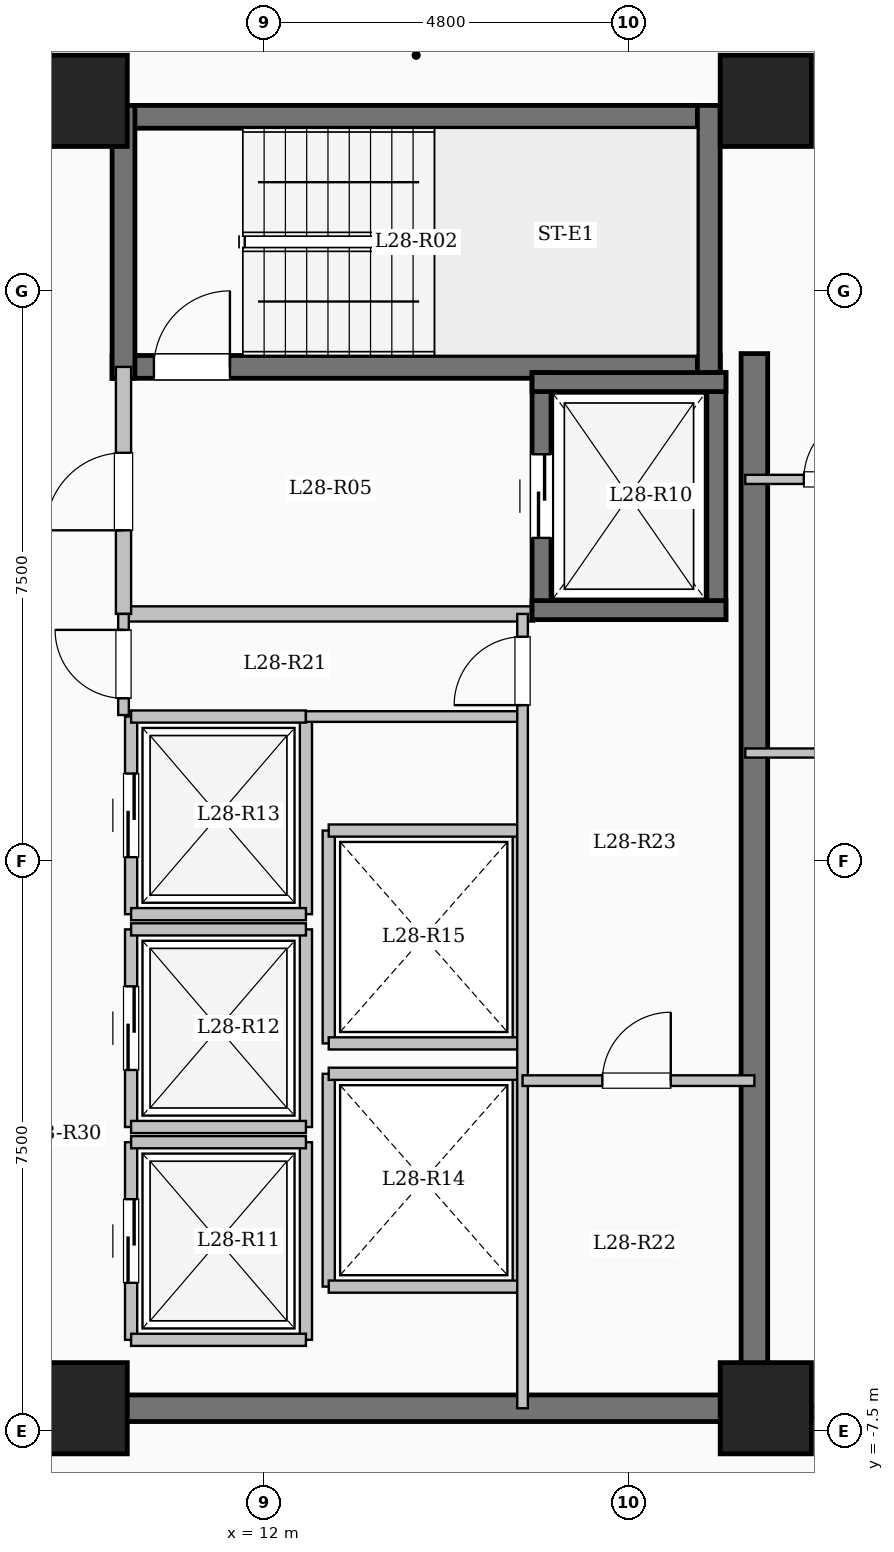
"""IFC4 building model, lengths in metres.
Left out: names, types, materials, properties, quantities, classifications, styles, units other than length and angle.
Written with IfcOpenShell. Run it as: python <this file> out.ifc"""

import sys

from ifc_helpers import new_model, si_unit, direction, frame, frame_2d, origin, origin_2d, place, context, subcontext, project, spatial, rectangle, extrude, element, fill, save


model = new_model("IFC4")
c1 = context("Model", 3, precision=1e-05, world=origin(), true_north=direction((0.0, 1.0)))
c2 = subcontext(c1, "Body", "Model", "MODEL_VIEW")
j1 = project(units=[si_unit("LENGTHUNIT", "METRE"), si_unit("PLANEANGLEUNIT", "RADIAN")], contexts=[c1])
p1 = place(None, origin())
s1 = spatial("IfcSite", under=j1, at=p1, CompositionType="ELEMENT")
p2 = place(p1, origin())
s2 = spatial("IfcBuilding", under=s1, at=p2, CompositionType="ELEMENT")
p3 = place(p2, frame((0.0, 0.0, 105.1)))
s3 = spatial("IfcBuildingStorey", under=s2, at=p3, CompositionType="ELEMENT", Elevation=105.1)
for number, where, z_axis, x_axis in (
    (1, (9.6, -7.2, 0.0), (0.0, 0.0, 1.0), (1.0, 0.0, 0.0)),
    (2, (9.6, 10.0, 0.0), (0.0, 0.0, 1.0), (1.0, 0.0, 0.0)),
    (3, (18.6, -7.2, 0.0), (0.0, 0.0, 1.0), (1.0, 0.0, 0.0)),
    (4, (18.6, 10.0, 0.0), (0.0, 0.0, 1.0), (1.0, 0.0, 0.0)),
):
    element("IfcColumn", number, at=place(p3, frame(where, z_axis=z_axis, x_axis=x_axis)), inside=s3, PredefinedType="COLUMN", context=c2, shape_type="SweptSolid", body=[
        extrude(rectangle(XDim=1.2, YDim=1.2, at=origin_2d()), origin(), (0.0, 0.0, 1.0), 3.35),
    ])
p4 = place(p3, frame((10.0, 9.79, 0.0), z_axis=(0.0, 0.0, 1.0), x_axis=(1.0, 0.0, 0.0)))
e5 = element("IfcWall", 5, at=p4, inside=s3, PredefinedType="SHEAR", context=c2, shape_type="SweptSolid", body=[
    extrude(rectangle(XDim=8.0, YDim=0.3, at=frame_2d((4.0, 0.0))), origin(), (0.0, 0.0, 1.0), 3.35),
])
p5 = place(p3, frame((10.0, 6.5, 0.0), z_axis=(0.0, 0.0, 1.0), x_axis=(1.0, 0.0, 0.0)))
e6 = element("IfcWall", 6, at=p5, inside=s3, PredefinedType="SHEAR", context=c2, shape_type="SweptSolid", body=[
    extrude(rectangle(XDim=8.0, YDim=0.3, at=frame_2d((4.0, 0.0))), origin(), (0.0, 0.0, 1.0), 3.35),
])
p6 = place(p5, frame((0.55, 0.0, 0.0)))
e7 = element("IfcOpeningElement", 7, at=p6, cuts=e6, PredefinedType="OPENING", context=c2, shape_type="SweptSolid", body=[
    extrude(rectangle(XDim=1.0, YDim=2.15, at=frame_2d((0.5, 1.075))), frame((0.0, 0.16, 0.0), z_axis=(0.0, -1.0, 0.0), x_axis=(1.0, 0.0, 0.0)), (0.0, 0.0, 1.0), 0.32),
])
for number, where, z_axis, x_axis in (
    (8, (10.15, 6.35, 0.0), (0.0, 0.0, 1.0), (0.0, 1.0, 0.0)),
    (9, (17.85, 6.35, 0.0), (0.0, 0.0, 1.0), (0.0, 1.0, 0.0)),
):
    element("IfcWall", number, at=place(p3, frame(where, z_axis=z_axis, x_axis=x_axis)), inside=s3, PredefinedType="SHEAR", context=c2, shape_type="SweptSolid", body=[
        extrude(rectangle(XDim=3.59, YDim=0.3, at=frame_2d((1.795, 0.0))), origin(), (0.0, 0.0, 1.0), 3.35),
    ])
p7 = place(p3, frame((10.15, 3.25, 0.0), z_axis=(0.0, 0.0, 1.0), x_axis=(1.0, 0.0, 0.0)))
e10 = element("IfcWall", 10, at=p7, inside=s3, PredefinedType="SOLIDWALL", context=c2, shape_type="SweptSolid", body=[
    extrude(rectangle(XDim=5.4, YDim=0.2, at=frame_2d((2.7, 0.0))), origin(), (0.0, 0.0, 1.0), 3.1),
])
p8 = place(p3, frame((10.15, 3.25, 0.0), z_axis=(0.0, 0.0, 1.0), x_axis=(0.0, 1.0, 0.0)))
e11 = element("IfcWall", 11, at=p8, inside=s3, PredefinedType="SOLIDWALL", context=c2, shape_type="SweptSolid", body=[
    extrude(rectangle(XDim=3.25, YDim=0.2, at=frame_2d((1.625, 0.0))), origin(), (0.0, 0.0, 1.0), 3.1),
])
p9 = place(p8, frame((1.1, 0.0, 0.0)))
e12 = element("IfcOpeningElement", 12, at=p9, cuts=e11, PredefinedType="OPENING", context=c2, shape_type="SweptSolid", body=[
    extrude(rectangle(XDim=1.02, YDim=2.15, at=frame_2d((0.51, 1.075))), frame((0.0, 0.11, 0.0), z_axis=(0.0, -1.0, 0.0), x_axis=(1.0, 0.0, 0.0)), (0.0, 0.0, 1.0), 0.22),
])
p10 = place(p3, frame((15.65, 3.175, 0.0), z_axis=(0.0, 0.0, 1.0), x_axis=(0.0, 1.0, 0.0)))
e13 = element("IfcWall", 13, at=p10, inside=s3, PredefinedType="SHEAR", context=c2, shape_type="SweptSolid", body=[
    extrude(rectangle(XDim=3.25, YDim=0.25, at=frame_2d((1.625, 0.0))), origin(), (0.0, 0.0, 1.0), 3.35),
])
p11 = place(p10, frame((1.075, 0.0, 0.0)))
e14 = element("IfcOpeningElement", 14, at=p11, cuts=e13, PredefinedType="OPENING", context=c2, shape_type="SweptSolid", body=[
    extrude(rectangle(XDim=1.1, YDim=2.15, at=frame_2d((0.55, 1.075))), frame((0.0, 0.135, 0.0), z_axis=(0.0, -1.0, 0.0), x_axis=(1.0, 0.0, 0.0)), (0.0, 0.0, 1.0), 0.27),
])
p12 = place(p3, frame((17.95, 3.175, 0.0), z_axis=(0.0, 0.0, 1.0), x_axis=(0.0, 1.0, 0.0)))
e15 = element("IfcWall", 15, at=p12, inside=s3, PredefinedType="SHEAR", context=c2, shape_type="SweptSolid", body=[
    extrude(rectangle(XDim=3.25, YDim=0.25, at=frame_2d((1.625, 0.0))), origin(), (0.0, 0.0, 1.0), 3.35),
])
for number, where, z_axis, x_axis in (
    (16, (15.525, 3.3, 0.0), (0.0, 0.0, 1.0), (1.0, 0.0, 0.0)),
    (17, (15.525, 6.3, 0.0), (0.0, 0.0, 1.0), (1.0, 0.0, 0.0)),
):
    element("IfcWall", number, at=place(p3, frame(where, z_axis=z_axis, x_axis=x_axis)), inside=s3, PredefinedType="SHEAR", context=c2, shape_type="SweptSolid", body=[
        extrude(rectangle(XDim=2.55, YDim=0.25, at=frame_2d((1.275, 0.0))), origin(), (0.0, 0.0, 1.0), 3.35),
    ])
p13 = place(p3, frame((10.25, -6.3, 0.0), z_axis=(0.0, 0.0, 1.0), x_axis=(0.0, 1.0, 0.0)))
e18 = element("IfcWall", 18, at=p13, inside=s3, PredefinedType="SOLIDWALL", context=c2, shape_type="SweptSolid", body=[
    extrude(rectangle(XDim=2.6, YDim=0.16, at=frame_2d((1.3, 0.0))), origin(), (0.0, 0.0, 1.0), 3.1),
])
p14 = place(p13, frame((0.75, 0.0, 0.0)))
e19 = element("IfcOpeningElement", 19, at=p14, cuts=e18, PredefinedType="OPENING", context=c2, shape_type="SweptSolid", body=[
    extrude(rectangle(XDim=1.1, YDim=2.15, at=frame_2d((0.55, 1.075))), frame((0.0, 0.09, 0.0), z_axis=(0.0, -1.0, 0.0), x_axis=(1.0, 0.0, 0.0)), (0.0, 0.0, 1.0), 0.18),
])
p15 = place(p3, frame((12.55, -6.3, 0.0), z_axis=(0.0, 0.0, 1.0), x_axis=(0.0, 1.0, 0.0)))
e20 = element("IfcWall", 20, at=p15, inside=s3, PredefinedType="SOLIDWALL", context=c2, shape_type="SweptSolid", body=[
    extrude(rectangle(XDim=2.6, YDim=0.16, at=frame_2d((1.3, 0.0))), origin(), (0.0, 0.0, 1.0), 3.1),
])
for number, where, z_axis, x_axis in (
    (21, (10.25, -6.3, 0.0), (0.0, 0.0, 1.0), (1.0, 0.0, 0.0)),
    (22, (10.25, -3.7, 0.0), (0.0, 0.0, 1.0), (1.0, 0.0, 0.0)),
):
    element("IfcWall", number, at=place(p3, frame(where, z_axis=z_axis, x_axis=x_axis)), inside=s3, PredefinedType="SOLIDWALL", context=c2, shape_type="SweptSolid", body=[
        extrude(rectangle(XDim=2.3, YDim=0.16, at=frame_2d((1.15, 0.0))), origin(), (0.0, 0.0, 1.0), 3.1),
    ])
p16 = place(p3, frame((10.25, -3.5, 0.0), z_axis=(0.0, 0.0, 1.0), x_axis=(0.0, 1.0, 0.0)))
e23 = element("IfcWall", 23, at=p16, inside=s3, PredefinedType="SOLIDWALL", context=c2, shape_type="SweptSolid", body=[
    extrude(rectangle(XDim=2.6, YDim=0.16, at=frame_2d((1.3, 0.0))), origin(), (0.0, 0.0, 1.0), 3.1),
])
p17 = place(p16, frame((0.75, 0.0, 0.0)))
e24 = element("IfcOpeningElement", 24, at=p17, cuts=e23, PredefinedType="OPENING", context=c2, shape_type="SweptSolid", body=[
    extrude(rectangle(XDim=1.1, YDim=2.15, at=frame_2d((0.55, 1.075))), frame((0.0, 0.09, 0.0), z_axis=(0.0, -1.0, 0.0), x_axis=(1.0, 0.0, 0.0)), (0.0, 0.0, 1.0), 0.18),
])
p18 = place(p3, frame((12.55, -3.5, 0.0), z_axis=(0.0, 0.0, 1.0), x_axis=(0.0, 1.0, 0.0)))
e25 = element("IfcWall", 25, at=p18, inside=s3, PredefinedType="SOLIDWALL", context=c2, shape_type="SweptSolid", body=[
    extrude(rectangle(XDim=2.6, YDim=0.16, at=frame_2d((1.3, 0.0))), origin(), (0.0, 0.0, 1.0), 3.1),
])
for number, where, z_axis, x_axis in (
    (26, (10.25, -3.5, 0.0), (0.0, 0.0, 1.0), (1.0, 0.0, 0.0)),
    (27, (10.25, -0.9, 0.0), (0.0, 0.0, 1.0), (1.0, 0.0, 0.0)),
):
    element("IfcWall", number, at=place(p3, frame(where, z_axis=z_axis, x_axis=x_axis)), inside=s3, PredefinedType="SOLIDWALL", context=c2, shape_type="SweptSolid", body=[
        extrude(rectangle(XDim=2.3, YDim=0.16, at=frame_2d((1.15, 0.0))), origin(), (0.0, 0.0, 1.0), 3.1),
    ])
p19 = place(p3, frame((10.25, -0.7, 0.0), z_axis=(0.0, 0.0, 1.0), x_axis=(0.0, 1.0, 0.0)))
e28 = element("IfcWall", 28, at=p19, inside=s3, PredefinedType="SOLIDWALL", context=c2, shape_type="SweptSolid", body=[
    extrude(rectangle(XDim=2.6, YDim=0.16, at=frame_2d((1.3, 0.0))), origin(), (0.0, 0.0, 1.0), 3.1),
])
p20 = place(p19, frame((0.75, 0.0, 0.0)))
e29 = element("IfcOpeningElement", 29, at=p20, cuts=e28, PredefinedType="OPENING", context=c2, shape_type="SweptSolid", body=[
    extrude(rectangle(XDim=1.1, YDim=2.15, at=frame_2d((0.55, 1.075))), frame((0.0, 0.09, 0.0), z_axis=(0.0, -1.0, 0.0), x_axis=(1.0, 0.0, 0.0)), (0.0, 0.0, 1.0), 0.18),
])
p21 = place(p3, frame((12.55, -0.7, 0.0), z_axis=(0.0, 0.0, 1.0), x_axis=(0.0, 1.0, 0.0)))
e30 = element("IfcWall", 30, at=p21, inside=s3, PredefinedType="SOLIDWALL", context=c2, shape_type="SweptSolid", body=[
    extrude(rectangle(XDim=2.6, YDim=0.16, at=frame_2d((1.3, 0.0))), origin(), (0.0, 0.0, 1.0), 3.1),
])
for number, where, z_axis, x_axis in (
    (31, (10.25, -0.7, 0.0), (0.0, 0.0, 1.0), (1.0, 0.0, 0.0)),
    (32, (10.25, 1.9, 0.0), (0.0, 0.0, 1.0), (1.0, 0.0, 0.0)),
):
    element("IfcWall", number, at=place(p3, frame(where, z_axis=z_axis, x_axis=x_axis)), inside=s3, PredefinedType="SOLIDWALL", context=c2, shape_type="SweptSolid", body=[
        extrude(rectangle(XDim=2.3, YDim=0.16, at=frame_2d((1.15, 0.0))), origin(), (0.0, 0.0, 1.0), 3.1),
    ])
for number, where, z_axis, x_axis in (
    (33, (12.85, -5.6, 0.0), (0.0, 0.0, 1.0), (0.0, 1.0, 0.0)),
    (34, (15.35, -5.6, 0.0), (0.0, 0.0, 1.0), (0.0, 1.0, 0.0)),
):
    element("IfcWall", number, at=place(p3, frame(where, z_axis=z_axis, x_axis=x_axis)), inside=s3, PredefinedType="SOLIDWALL", context=c2, shape_type="SweptSolid", body=[
        extrude(rectangle(XDim=2.8, YDim=0.16, at=frame_2d((1.4, 0.0))), origin(), (0.0, 0.0, 1.0), 3.1),
    ])
for number, where, z_axis, x_axis in (
    (35, (12.85, -5.6, 0.0), (0.0, 0.0, 1.0), (1.0, 0.0, 0.0)),
    (36, (12.85, -2.8, 0.0), (0.0, 0.0, 1.0), (1.0, 0.0, 0.0)),
):
    element("IfcWall", number, at=place(p3, frame(where, z_axis=z_axis, x_axis=x_axis)), inside=s3, PredefinedType="SOLIDWALL", context=c2, shape_type="SweptSolid", body=[
        extrude(rectangle(XDim=2.5, YDim=0.16, at=frame_2d((1.25, 0.0))), origin(), (0.0, 0.0, 1.0), 3.1),
    ])
for number, where, z_axis, x_axis in (
    (37, (12.85, -2.4, 0.0), (0.0, 0.0, 1.0), (0.0, 1.0, 0.0)),
    (38, (15.35, -2.4, 0.0), (0.0, 0.0, 1.0), (0.0, 1.0, 0.0)),
):
    element("IfcWall", number, at=place(p3, frame(where, z_axis=z_axis, x_axis=x_axis)), inside=s3, PredefinedType="SOLIDWALL", context=c2, shape_type="SweptSolid", body=[
        extrude(rectangle(XDim=2.8, YDim=0.16, at=frame_2d((1.4, 0.0))), origin(), (0.0, 0.0, 1.0), 3.1),
    ])
for number, where, z_axis, x_axis in (
    (39, (12.85, -2.4, 0.0), (0.0, 0.0, 1.0), (1.0, 0.0, 0.0)),
    (40, (12.85, 0.4, 0.0), (0.0, 0.0, 1.0), (1.0, 0.0, 0.0)),
):
    element("IfcWall", number, at=place(p3, frame(where, z_axis=z_axis, x_axis=x_axis)), inside=s3, PredefinedType="SOLIDWALL", context=c2, shape_type="SweptSolid", body=[
        extrude(rectangle(XDim=2.5, YDim=0.16, at=frame_2d((1.25, 0.0))), origin(), (0.0, 0.0, 1.0), 3.1),
    ])
p22 = place(p3, frame((18.45, -7.375, 0.0), z_axis=(0.0, 0.0, 1.0), x_axis=(0.0, 1.0, 0.0)))
e41 = element("IfcWall", 41, at=p22, inside=s3, PredefinedType="SHEAR", context=c2, shape_type="SweptSolid", body=[
    extrude(rectangle(XDim=14.05, YDim=0.35, at=frame_2d((7.025, 0.0))), origin(), (0.0, 0.0, 1.0), 3.35),
])
p23 = place(p3, frame((10.075, -7.2, 0.0), z_axis=(0.0, 0.0, 1.0), x_axis=(1.0, 0.0, 0.0)))
e42 = element("IfcWall", 42, at=p23, inside=s3, PredefinedType="SHEAR", context=c2, shape_type="SweptSolid", body=[
    extrude(rectangle(XDim=8.55, YDim=0.35, at=frame_2d((4.275, 0.0))), origin(), (0.0, 0.0, 1.0), 3.35),
])
p24 = place(p3, frame((12.55, 1.9, 0.0), z_axis=(0.0, 0.0, 1.0), x_axis=(1.0, 0.0, 0.0)))
e43 = element("IfcWall", 43, at=p24, inside=s3, PredefinedType="PARTITIONING", context=c2, shape_type="SweptSolid", body=[
    extrude(rectangle(XDim=2.85, YDim=0.14, at=frame_2d((1.425, 0.0))), origin(), (0.0, 0.0, 1.0), 3.1),
])
p25 = place(p3, frame((10.15, 1.92, 0.0), z_axis=(0.0, 0.0, 1.0), x_axis=(0.0, 1.0, 0.0)))
e44 = element("IfcWall", 44, at=p25, inside=s3, PredefinedType="PARTITIONING", context=c2, shape_type="SweptSolid", body=[
    extrude(rectangle(XDim=1.33, YDim=0.14, at=frame_2d((0.665, 0.0))), origin(), (0.0, 0.0, 1.0), 3.1),
])
p26 = place(p25, frame((0.22, 0.0, 0.0)))
e45 = element("IfcOpeningElement", 45, at=p26, cuts=e44, PredefinedType="OPENING", context=c2, shape_type="SweptSolid", body=[
    extrude(rectangle(XDim=0.9, YDim=2.08, at=frame_2d((0.45, 1.04))), frame((0.0, 0.08, 0.0), z_axis=(0.0, -1.0, 0.0), x_axis=(1.0, 0.0, 0.0)), (0.0, 0.0, 1.0), 0.16),
])
p27 = place(p3, frame((15.4, -7.2, 0.0), z_axis=(0.0, 0.0, 1.0), x_axis=(0.0, 1.0, 0.0)))
e46 = element("IfcWall", 46, at=p27, inside=s3, PredefinedType="PARTITIONING", context=c2, shape_type="SweptSolid", body=[
    extrude(rectangle(XDim=10.45, YDim=0.14, at=frame_2d((5.225, 0.0))), origin(), (0.0, 0.0, 1.0), 3.1),
])
p28 = place(p27, frame((9.25, 0.0, 0.0)))
e47 = element("IfcOpeningElement", 47, at=p28, cuts=e46, PredefinedType="OPENING", context=c2, shape_type="SweptSolid", body=[
    extrude(rectangle(XDim=0.9, YDim=2.08, at=frame_2d((0.45, 1.04))), frame((0.0, 0.08, 0.0), z_axis=(0.0, -1.0, 0.0), x_axis=(1.0, 0.0, 0.0)), (0.0, 0.0, 1.0), 0.16),
])
p29 = place(p3, frame((15.4, -2.89, 0.0), z_axis=(0.0, 0.0, 1.0), x_axis=(1.0, 0.0, 0.0)))
e48 = element("IfcWall", 48, at=p29, inside=s3, PredefinedType="PARTITIONING", context=c2, shape_type="SweptSolid", body=[
    extrude(rectangle(XDim=3.05, YDim=0.14, at=frame_2d((1.525, 0.0))), origin(), (0.0, 0.0, 1.0), 3.1),
])
p30 = place(p29, frame((1.05, 0.0, 0.0)))
e49 = element("IfcOpeningElement", 49, at=p30, cuts=e48, PredefinedType="OPENING", context=c2, shape_type="SweptSolid", body=[
    extrude(rectangle(XDim=0.9, YDim=2.08, at=frame_2d((0.45, 1.04))), frame((0.0, 0.08, 0.0), z_axis=(0.0, -1.0, 0.0), x_axis=(1.0, 0.0, 0.0)), (0.0, 0.0, 1.0), 0.16),
])
p31 = place(p3, frame((18.45, -7.25, 0.0), z_axis=(0.0, 0.0, 1.0), x_axis=(1.0, 0.0, 0.0)))
e50 = element("IfcWall", 50, at=p31, inside=s3, PredefinedType="PARTITIONING", context=c2, shape_type="SweptSolid", body=[
    extrude(rectangle(XDim=8.43, YDim=0.15, at=frame_2d((4.215, 0.0))), origin(), (0.0, 0.0, 1.0), 3.1),
])
p32 = place(p31, frame((1.95, 0.0, 0.0)))
e51 = element("IfcOpeningElement", 51, at=p32, cuts=e50, PredefinedType="OPENING", context=c2, shape_type="SweptSolid", body=[
    extrude(rectangle(XDim=0.96, YDim=2.15, at=frame_2d((0.48, 1.075))), frame((0.0, 0.085, 0.0), z_axis=(0.0, -1.0, 0.0), x_axis=(1.0, 0.0, 0.0)), (0.0, 0.0, 1.0), 0.17),
])
p33 = place(p3, frame((18.33, 1.42, 0.0), z_axis=(0.0, 0.0, 1.0), x_axis=(1.0, 0.0, 0.0)))
e52 = element("IfcWall", 52, at=p33, inside=s3, PredefinedType="PARTITIONING", context=c2, shape_type="SweptSolid", body=[
    extrude(rectangle(XDim=8.67, YDim=0.12, at=frame_2d((4.335, 0.0))), origin(), (0.0, 0.0, 1.0), 3.1),
])
p34 = place(p33, frame((1.863, 0.0, 0.0)))
e53 = element("IfcOpeningElement", 53, at=p34, cuts=e52, PredefinedType="OPENING", context=c2, shape_type="SweptSolid", body=[
    extrude(rectangle(XDim=0.88, YDim=2.1, at=frame_2d((0.44, 1.05))), frame((0.0, 0.07, 0.0), z_axis=(0.0, -1.0, 0.0), x_axis=(1.0, 0.0, 0.0)), (0.0, 0.0, 1.0), 0.14),
])
p35 = place(p33, frame((6.028, 0.0, 0.0)))
e54 = element("IfcOpeningElement", 54, at=p35, cuts=e52, PredefinedType="OPENING", context=c2, shape_type="SweptSolid", body=[
    extrude(rectangle(XDim=0.88, YDim=2.1, at=frame_2d((0.44, 1.05))), frame((0.0, 0.07, 0.0), z_axis=(0.0, -1.0, 0.0), x_axis=(1.0, 0.0, 0.0)), (0.0, 0.0, 1.0), 0.14),
])
p36 = place(p3, frame((18.33, 5.02, 0.0), z_axis=(0.0, 0.0, 1.0), x_axis=(1.0, 0.0, 0.0)))
e55 = element("IfcWall", 55, at=p36, inside=s3, PredefinedType="PARTITIONING", context=c2, shape_type="SweptSolid", body=[
    extrude(rectangle(XDim=8.67, YDim=0.12, at=frame_2d((4.335, 0.0))), origin(), (0.0, 0.0, 1.0), 3.1),
])
p37 = place(p36, frame((0.77, 0.0, 0.0)))
e56 = element("IfcOpeningElement", 56, at=p37, cuts=e55, PredefinedType="OPENING", context=c2, shape_type="SweptSolid", body=[
    extrude(rectangle(XDim=0.88, YDim=2.1, at=frame_2d((0.44, 1.05))), frame((0.0, 0.07, 0.0), z_axis=(0.0, -1.0, 0.0), x_axis=(1.0, 0.0, 0.0)), (0.0, 0.0, 1.0), 0.14),
])
p38 = place(p6, origin())
e57 = element("IfcDoor", 57, at=p38, inside=s3, OperationType="SINGLE_SWING_RIGHT", PredefinedType="DOOR", context=c2, shape_type="SweptSolid", body=[
    extrude(rectangle(XDim=1.0, YDim=2.15, at=frame_2d((0.5, 1.075))), frame((0.0, 0.025, 0.0), z_axis=(0.0, -1.0, 0.0), x_axis=(1.0, 0.0, 0.0)), (0.0, 0.0, 1.0), 0.05),
])
fill(e7, e57)
p39 = place(p9, origin())
e58 = element("IfcDoor", 58, at=p39, inside=s3, OperationType="SINGLE_SWING_LEFT", PredefinedType="DOOR", context=c2, shape_type="SweptSolid", body=[
    extrude(rectangle(XDim=1.02, YDim=2.15, at=frame_2d((0.51, 1.075))), frame((0.0, 0.025, 0.0), z_axis=(0.0, -1.0, 0.0), x_axis=(1.0, 0.0, 0.0)), (0.0, 0.0, 1.0), 0.05),
])
fill(e12, e58)
p40 = place(p11, origin())
e59 = element("IfcDoor", 59, at=p40, inside=s3, OperationType="SLIDING_TO_LEFT", PredefinedType="DOOR", context=c2, shape_type="SweptSolid", body=[
    extrude(rectangle(XDim=1.1, YDim=2.15, at=frame_2d((0.55, 1.075))), frame((0.0, 0.025, 0.0), z_axis=(0.0, -1.0, 0.0), x_axis=(1.0, 0.0, 0.0)), (0.0, 0.0, 1.0), 0.05),
])
fill(e14, e59)
p41 = place(p14, origin())
e60 = element("IfcDoor", 60, at=p41, inside=s3, OperationType="SLIDING_TO_LEFT", PredefinedType="DOOR", context=c2, shape_type="SweptSolid", body=[
    extrude(rectangle(XDim=1.1, YDim=2.15, at=frame_2d((0.55, 1.075))), frame((0.0, 0.025, 0.0), z_axis=(0.0, -1.0, 0.0), x_axis=(1.0, 0.0, 0.0)), (0.0, 0.0, 1.0), 0.05),
])
fill(e19, e60)
p42 = place(p17, origin())
e61 = element("IfcDoor", 61, at=p42, inside=s3, OperationType="SLIDING_TO_LEFT", PredefinedType="DOOR", context=c2, shape_type="SweptSolid", body=[
    extrude(rectangle(XDim=1.1, YDim=2.15, at=frame_2d((0.55, 1.075))), frame((0.0, 0.025, 0.0), z_axis=(0.0, -1.0, 0.0), x_axis=(1.0, 0.0, 0.0)), (0.0, 0.0, 1.0), 0.05),
])
fill(e24, e61)
p43 = place(p20, origin())
e62 = element("IfcDoor", 62, at=p43, inside=s3, OperationType="SLIDING_TO_LEFT", PredefinedType="DOOR", context=c2, shape_type="SweptSolid", body=[
    extrude(rectangle(XDim=1.1, YDim=2.15, at=frame_2d((0.55, 1.075))), frame((0.0, 0.025, 0.0), z_axis=(0.0, -1.0, 0.0), x_axis=(1.0, 0.0, 0.0)), (0.0, 0.0, 1.0), 0.05),
])
fill(e29, e62)
p44 = place(p26, origin())
e63 = element("IfcDoor", 63, at=p44, inside=s3, OperationType="SINGLE_SWING_RIGHT", PredefinedType="DOOR", context=c2, shape_type="SweptSolid", body=[
    extrude(rectangle(XDim=0.9, YDim=2.08, at=frame_2d((0.45, 1.04))), frame((0.0, 0.025, 0.0), z_axis=(0.0, -1.0, 0.0), x_axis=(1.0, 0.0, 0.0)), (0.0, 0.0, 1.0), 0.05),
])
fill(e45, e63)
p45 = place(p28, origin())
e64 = element("IfcDoor", 64, at=p45, inside=s3, OperationType="SINGLE_SWING_LEFT", PredefinedType="DOOR", context=c2, shape_type="SweptSolid", body=[
    extrude(rectangle(XDim=0.9, YDim=2.08, at=frame_2d((0.45, 1.04))), frame((0.0, 0.025, 0.0), z_axis=(0.0, -1.0, 0.0), x_axis=(1.0, 0.0, 0.0)), (0.0, 0.0, 1.0), 0.05),
])
fill(e47, e64)
p46 = place(p30, origin())
e65 = element("IfcDoor", 65, at=p46, inside=s3, OperationType="SINGLE_SWING_RIGHT", PredefinedType="DOOR", context=c2, shape_type="SweptSolid", body=[
    extrude(rectangle(XDim=0.9, YDim=2.08, at=frame_2d((0.45, 1.04))), frame((0.0, 0.025, 0.0), z_axis=(0.0, -1.0, 0.0), x_axis=(1.0, 0.0, 0.0)), (0.0, 0.0, 1.0), 0.05),
])
fill(e49, e65)
p47 = place(p37, origin())
e66 = element("IfcDoor", 66, at=p47, inside=s3, OperationType="SINGLE_SWING_RIGHT", PredefinedType="DOOR", context=c2, shape_type="SweptSolid", body=[
    extrude(rectangle(XDim=0.88, YDim=2.1, at=frame_2d((0.44, 1.05))), frame((0.0, 0.025, 0.0), z_axis=(0.0, -1.0, 0.0), x_axis=(1.0, 0.0, 0.0)), (0.0, 0.0, 1.0), 0.05),
])
fill(e56, e66)
save(model, sys.argv[1])
